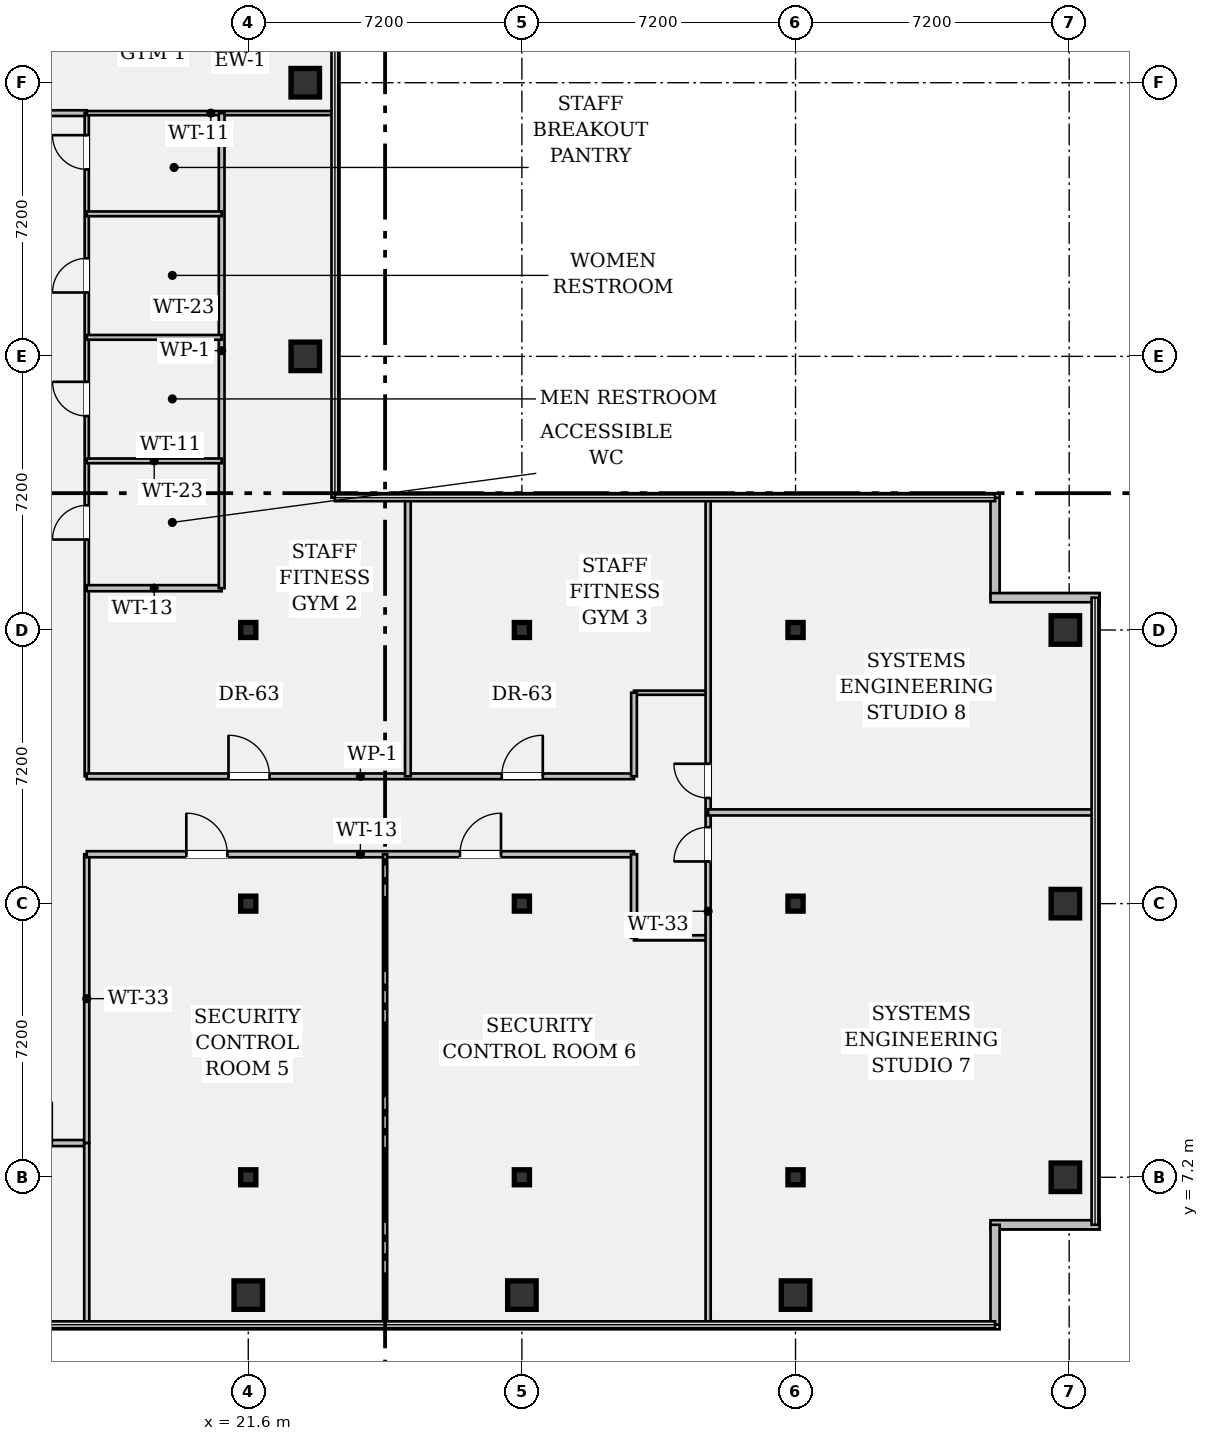
"""IFC4 building model, lengths in metres.
Left out: names, types, materials, properties, quantities, classifications, styles, units other than length and angle.
Written with IfcOpenShell. Run it as: python <this file> out.ifc"""

import sys

from ifc_helpers import new_model, si_unit, direction, frame, frame_2d, origin, origin_2d, place, context, subcontext, project, spatial, rectangle, hollow_rectangle, i_section, extrude, element, fill, save


model = new_model("IFC4")
c1 = context("Model", 3, precision=1e-05, world=origin(), true_north=direction((0.0, 1.0)))
c2 = subcontext(c1, "Body", "Model", "MODEL_VIEW")
j1 = project(units=[si_unit("LENGTHUNIT", "METRE"), si_unit("PLANEANGLEUNIT", "RADIAN")], contexts=[c1])
p1 = place(None, origin())
s1 = spatial("IfcSite", under=j1, at=p1, CompositionType="ELEMENT")
p2 = place(p1, origin())
s2 = spatial("IfcBuilding", under=s1, at=p2, CompositionType="ELEMENT")
p3 = place(p2, frame((0.0, 0.0, 208.25)))
s3 = spatial("IfcBuildingStorey", under=s2, at=p3, CompositionType="ELEMENT", Elevation=208.25)
p4 = place(p3, frame((21.6, 4.1, 0.0), z_axis=(0.0, 0.0, 1.0), x_axis=(1.0, 0.0, 0.0)))
e1 = element("IfcColumn", 1, at=p4, inside=s3, PredefinedType="COLUMN", context=c2, shape_type="SweptSolid", body=[
    extrude(hollow_rectangle(XDim=0.75, YDim=0.75, WallThickness=0.045, at=origin_2d()), origin(), (0.0, 0.0, 1.0), 3.24),
])
for number, where, z_axis, x_axis in (
    (2, (21.6, 7.2, 0.0), (0.0, 0.0, 1.0), (1.0, 0.0, 0.0)),
    (3, (21.6, 14.4, 0.0), (0.0, 0.0, 1.0), (1.0, 0.0, 0.0)),
    (4, (21.6, 21.6, 0.0), (0.0, 0.0, 1.0), (1.0, 0.0, 0.0)),
):
    element("IfcColumn", number, at=place(p3, frame(where, z_axis=z_axis, x_axis=x_axis)), inside=s3, PredefinedType="COLUMN", context=c2, shape_type="SweptSolid", body=[
        extrude(i_section(OverallWidth=0.399, OverallDepth=0.394, WebThickness=0.023, FlangeThickness=0.037, FilletRadius=0.018, at=origin_2d()), origin(), (0.0, 0.0, 1.0), 3.24),
    ])
for number, where, z_axis, x_axis in (
    (5, (23.1, 28.8, 0.0), (0.0, 0.0, 1.0), (1.0, 0.0, 0.0)),
    (6, (23.1, 36.0, 0.0), (0.0, 0.0, 1.0), (1.0, 0.0, 0.0)),
    (7, (28.8, 4.1, 0.0), (0.0, 0.0, 1.0), (1.0, 0.0, 0.0)),
):
    element("IfcColumn", number, at=place(p3, frame(where, z_axis=z_axis, x_axis=x_axis)), inside=s3, PredefinedType="COLUMN", context=c2, shape_type="SweptSolid", body=[
        extrude(hollow_rectangle(XDim=0.75, YDim=0.75, WallThickness=0.045, at=origin_2d()), origin(), (0.0, 0.0, 1.0), 3.24),
    ])
for number, where, z_axis, x_axis in (
    (8, (28.8, 7.2, 0.0), (0.0, 0.0, 1.0), (1.0, 0.0, 0.0)),
    (9, (28.8, 14.4, 0.0), (0.0, 0.0, 1.0), (1.0, 0.0, 0.0)),
    (10, (28.8, 21.6, 0.0), (0.0, 0.0, 1.0), (1.0, 0.0, 0.0)),
):
    element("IfcColumn", number, at=place(p3, frame(where, z_axis=z_axis, x_axis=x_axis)), inside=s3, PredefinedType="COLUMN", context=c2, shape_type="SweptSolid", body=[
        extrude(i_section(OverallWidth=0.399, OverallDepth=0.394, WebThickness=0.023, FlangeThickness=0.037, FilletRadius=0.018, at=origin_2d()), origin(), (0.0, 0.0, 1.0), 3.24),
    ])
p5 = place(p3, frame((36.0, 4.1, 0.0), z_axis=(0.0, 0.0, 1.0), x_axis=(1.0, 0.0, 0.0)))
e11 = element("IfcColumn", 11, at=p5, inside=s3, PredefinedType="COLUMN", context=c2, shape_type="SweptSolid", body=[
    extrude(hollow_rectangle(XDim=0.75, YDim=0.75, WallThickness=0.045, at=origin_2d()), origin(), (0.0, 0.0, 1.0), 3.24),
])
for number, where, z_axis, x_axis in (
    (12, (36.0, 7.2, 0.0), (0.0, 0.0, 1.0), (1.0, 0.0, 0.0)),
    (13, (36.0, 14.4, 0.0), (0.0, 0.0, 1.0), (1.0, 0.0, 0.0)),
    (14, (36.0, 21.6, 0.0), (0.0, 0.0, 1.0), (1.0, 0.0, 0.0)),
):
    element("IfcColumn", number, at=place(p3, frame(where, z_axis=z_axis, x_axis=x_axis)), inside=s3, PredefinedType="COLUMN", context=c2, shape_type="SweptSolid", body=[
        extrude(i_section(OverallWidth=0.399, OverallDepth=0.394, WebThickness=0.023, FlangeThickness=0.037, FilletRadius=0.018, at=origin_2d()), origin(), (0.0, 0.0, 1.0), 3.24),
    ])
for number, where, z_axis, x_axis in (
    (15, (43.1, 7.2, 0.0), (0.0, 0.0, 1.0), (1.0, 0.0, 0.0)),
    (16, (43.1, 14.4, 0.0), (0.0, 0.0, 1.0), (1.0, 0.0, 0.0)),
    (17, (43.1, 21.6, 0.0), (0.0, 0.0, 1.0), (1.0, 0.0, 0.0)),
):
    element("IfcColumn", number, at=place(p3, frame(where, z_axis=z_axis, x_axis=x_axis)), inside=s3, PredefinedType="COLUMN", context=c2, shape_type="SweptSolid", body=[
        extrude(hollow_rectangle(XDim=0.75, YDim=0.75, WallThickness=0.045, at=origin_2d()), origin(), (0.0, 0.0, 1.0), 3.24),
    ])
p6 = place(p3, frame((41.25, 25.08, 0.0), z_axis=(0.0, 0.0, 1.0), x_axis=(0.0, -1.0, 0.0)))
e18 = element("IfcWall", 18, at=p6, inside=s3, PredefinedType="STANDARD", context=c2, shape_type="SweptSolid", body=[
    extrude(rectangle(XDim=2.63, YDim=0.24, at=frame_2d((1.315, 0.0))), origin(), (0.0, 0.0, 1.0), 3.24),
])
for number, where, z_axis, x_axis in (
    (19, (41.13, 22.45, 0.0), (0.0, 0.0, 1.0), (1.0, 0.0, 0.0)),
    (20, (44.0, 5.95, 0.0), (0.0, 0.0, 1.0), (-1.0, 0.0, 0.0)),
):
    element("IfcWall", number, at=place(p3, frame(where, z_axis=z_axis, x_axis=x_axis)), inside=s3, PredefinedType="STANDARD", context=c2, shape_type="SweptSolid", body=[
        extrude(rectangle(XDim=2.87, YDim=0.24, at=frame_2d((1.435, 0.0))), origin(), (0.0, 0.0, 1.0), 3.24),
    ])
p7 = place(p3, frame((41.25, 5.95, 0.0), z_axis=(0.0, 0.0, 1.0), x_axis=(0.0, -1.0, 0.0)))
e21 = element("IfcWall", 21, at=p7, inside=s3, PredefinedType="STANDARD", context=c2, shape_type="SweptSolid", body=[
    extrude(rectangle(XDim=2.63, YDim=0.24, at=frame_2d((1.315, 0.0))), origin(), (0.0, 0.0, 1.0), 3.24),
])
p8 = place(p3, frame((14.4, 8.1, 0.0), z_axis=(0.0, 0.0, 1.0), x_axis=(1.0, 0.0, 0.0)))
e22 = element("IfcWall", 22, at=p8, inside=s3, PredefinedType="PARTITIONING", context=c2, shape_type="SweptSolid", body=[
    extrude(rectangle(XDim=2.95, YDim=0.16, at=frame_2d((1.475, 0.0))), origin(), (0.0, 0.0, 1.0), 2.808),
])
p9 = place(p8, frame((0.95, 0.0, 0.0)))
e23 = element("IfcOpeningElement", 23, at=p9, cuts=e22, PredefinedType="OPENING", context=c2, shape_type="SweptSolid", body=[
    extrude(rectangle(XDim=1.08, YDim=2.15, at=frame_2d((0.54, 1.075))), frame((0.0, 0.092, 0.0), z_axis=(0.0, -1.0, 0.0), x_axis=(1.0, 0.0, 0.0)), (0.0, 0.0, 1.0), 0.184),
])
p10 = place(p3, frame((14.4, 35.2, 0.0), z_axis=(0.0, 0.0, 1.0), x_axis=(1.0, 0.0, 0.0)))
e24 = element("IfcWall", 24, at=p10, inside=s3, PredefinedType="PARTITIONING", context=c2, shape_type="SweptSolid", body=[
    extrude(rectangle(XDim=2.95, YDim=0.15, at=frame_2d((1.475, 0.0))), origin(), (0.0, 0.0, 1.0), 2.808),
])
p11 = place(p10, frame((0.95, 0.0, 0.0)))
e25 = element("IfcOpeningElement", 25, at=p11, cuts=e24, PredefinedType="OPENING", context=c2, shape_type="SweptSolid", body=[
    extrude(rectangle(XDim=1.0, YDim=2.15, at=frame_2d((0.5, 1.075))), frame((0.0, 0.087, 0.0), z_axis=(0.0, -1.0, 0.0), x_axis=(1.0, 0.0, 0.0)), (0.0, 0.0, 1.0), 0.174),
])
p12 = place(p3, frame((17.35, 8.1, 0.0), z_axis=(0.0, 0.0, 1.0), x_axis=(0.0, 1.0, 0.0)))
e26 = element("IfcWall", 26, at=p12, inside=s3, PredefinedType="PARTITIONING", context=c2, shape_type="SweptSolid", body=[
    extrude(rectangle(XDim=7.6, YDim=0.135, at=frame_2d((3.8, 0.0))), origin(), (0.0, 0.0, 1.0), 2.613),
])
p13 = place(p3, frame((17.35, 17.75, 0.0), z_axis=(0.0, 0.0, 1.0), x_axis=(0.0, 1.0, 0.0)))
e27 = element("IfcWall", 27, at=p13, inside=s3, PredefinedType="PARTITIONING", context=c2, shape_type="SweptSolid", body=[
    extrude(rectangle(XDim=17.45, YDim=0.11, at=frame_2d((8.725, 0.0))), origin(), (0.0, 0.0, 1.0), 2.613),
])
p14 = place(p13, frame((6.23, 0.0, 0.0)))
e28 = element("IfcOpeningElement", 28, at=p14, cuts=e27, PredefinedType="OPENING", context=c2, shape_type="SweptSolid", body=[
    extrude(rectangle(XDim=0.9, YDim=2.15, at=frame_2d((0.45, 1.075))), frame((0.0, 0.067, 0.0), z_axis=(0.0, -1.0, 0.0), x_axis=(1.0, 0.0, 0.0)), (0.0, 0.0, 1.0), 0.134),
])
p15 = place(p13, frame((9.48, 0.0, 0.0)))
e29 = element("IfcOpeningElement", 29, at=p15, cuts=e27, PredefinedType="OPENING", context=c2, shape_type="SweptSolid", body=[
    extrude(rectangle(XDim=0.9, YDim=2.15, at=frame_2d((0.45, 1.075))), frame((0.0, 0.067, 0.0), z_axis=(0.0, -1.0, 0.0), x_axis=(1.0, 0.0, 0.0)), (0.0, 0.0, 1.0), 0.134),
])
p16 = place(p13, frame((12.73, 0.0, 0.0)))
e30 = element("IfcOpeningElement", 30, at=p16, cuts=e27, PredefinedType="OPENING", context=c2, shape_type="SweptSolid", body=[
    extrude(rectangle(XDim=0.9, YDim=2.15, at=frame_2d((0.45, 1.075))), frame((0.0, 0.067, 0.0), z_axis=(0.0, -1.0, 0.0), x_axis=(1.0, 0.0, 0.0)), (0.0, 0.0, 1.0), 0.134),
])
p17 = place(p13, frame((15.97, 0.0, 0.0)))
e31 = element("IfcOpeningElement", 31, at=p17, cuts=e27, PredefinedType="OPENING", context=c2, shape_type="SweptSolid", body=[
    extrude(rectangle(XDim=0.9, YDim=2.15, at=frame_2d((0.45, 1.075))), frame((0.0, 0.067, 0.0), z_axis=(0.0, -1.0, 0.0), x_axis=(1.0, 0.0, 0.0)), (0.0, 0.0, 1.0), 0.134),
])
p18 = place(p3, frame((17.35, 15.7, 0.0), z_axis=(0.0, 0.0, 1.0), x_axis=(1.0, 0.0, 0.0)))
e32 = element("IfcWall", 32, at=p18, inside=s3, PredefinedType="PARTITIONING", context=c2, shape_type="SweptSolid", body=[
    extrude(rectangle(XDim=14.4, YDim=0.16, at=frame_2d((7.2, 0.0))), origin(), (0.0, 0.0, 1.0), 2.613),
])
p19 = place(p18, frame((2.62, 0.0, 0.0)))
e33 = element("IfcOpeningElement", 33, at=p19, cuts=e32, PredefinedType="OPENING", context=c2, shape_type="SweptSolid", body=[
    extrude(rectangle(XDim=1.08, YDim=2.15, at=frame_2d((0.54, 1.075))), frame((0.0, 0.092, 0.0), z_axis=(0.0, -1.0, 0.0), x_axis=(1.0, 0.0, 0.0)), (0.0, 0.0, 1.0), 0.184),
])
p20 = place(p18, frame((9.82, 0.0, 0.0)))
e34 = element("IfcOpeningElement", 34, at=p20, cuts=e32, PredefinedType="OPENING", context=c2, shape_type="SweptSolid", body=[
    extrude(rectangle(XDim=1.08, YDim=2.15, at=frame_2d((0.54, 1.075))), frame((0.0, 0.092, 0.0), z_axis=(0.0, -1.0, 0.0), x_axis=(1.0, 0.0, 0.0)), (0.0, 0.0, 1.0), 0.184),
])
p21 = place(p3, frame((17.35, 17.75, 0.0), z_axis=(0.0, 0.0, 1.0), x_axis=(1.0, 0.0, 0.0)))
e35 = element("IfcWall", 35, at=p21, inside=s3, PredefinedType="PARTITIONING", context=c2, shape_type="SweptSolid", body=[
    extrude(rectangle(XDim=14.4, YDim=0.15, at=frame_2d((7.2, 0.0))), origin(), (0.0, 0.0, 1.0), 2.613),
])
p22 = place(p21, frame((3.73, 0.0, 0.0)))
e36 = element("IfcOpeningElement", 36, at=p22, cuts=e35, PredefinedType="OPENING", context=c2, shape_type="SweptSolid", body=[
    extrude(rectangle(XDim=1.08, YDim=2.15, at=frame_2d((0.54, 1.075))), frame((0.0, 0.087, 0.0), z_axis=(0.0, -1.0, 0.0), x_axis=(1.0, 0.0, 0.0)), (0.0, 0.0, 1.0), 0.174),
])
p23 = place(p21, frame((10.92, 0.0, 0.0)))
e37 = element("IfcOpeningElement", 37, at=p23, cuts=e35, PredefinedType="OPENING", context=c2, shape_type="SweptSolid", body=[
    extrude(rectangle(XDim=1.08, YDim=2.15, at=frame_2d((0.54, 1.075))), frame((0.0, 0.087, 0.0), z_axis=(0.0, -1.0, 0.0), x_axis=(1.0, 0.0, 0.0)), (0.0, 0.0, 1.0), 0.174),
])
p24 = place(p3, frame((31.75, 13.5, 0.0), z_axis=(0.0, 0.0, 1.0), x_axis=(1.0, 0.0, 0.0)))
e38 = element("IfcWall", 38, at=p24, inside=s3, PredefinedType="PARTITIONING", context=c2, shape_type="SweptSolid", body=[
    extrude(rectangle(XDim=1.95, YDim=0.135, at=frame_2d((0.975, 0.0))), origin(), (0.0, 0.0, 1.0), 2.808),
])
p25 = place(p3, frame((31.75, 19.95, 0.0), z_axis=(0.0, 0.0, 1.0), x_axis=(1.0, 0.0, 0.0)))
e39 = element("IfcWall", 39, at=p25, inside=s3, PredefinedType="PARTITIONING", context=c2, shape_type="SweptSolid", body=[
    extrude(rectangle(XDim=1.95, YDim=0.11, at=frame_2d((0.975, 0.0))), origin(), (0.0, 0.0, 1.0), 2.808),
])
p26 = place(p3, frame((31.75, 13.5, 0.0), z_axis=(0.0, 0.0, 1.0), x_axis=(0.0, 1.0, 0.0)))
e40 = element("IfcWall", 40, at=p26, inside=s3, PredefinedType="PARTITIONING", context=c2, shape_type="SweptSolid", body=[
    extrude(rectangle(XDim=2.2, YDim=0.16, at=frame_2d((1.1, 0.0))), origin(), (0.0, 0.0, 1.0), 2.613),
])
p27 = place(p3, frame((31.75, 17.75, 0.0), z_axis=(0.0, 0.0, 1.0), x_axis=(0.0, 1.0, 0.0)))
e41 = element("IfcWall", 41, at=p27, inside=s3, PredefinedType="PARTITIONING", context=c2, shape_type="SweptSolid", body=[
    extrude(rectangle(XDim=2.2, YDim=0.15, at=frame_2d((1.1, 0.0))), origin(), (0.0, 0.0, 1.0), 3.24),
])
p28 = place(p3, frame((33.7, 3.32, 0.0), z_axis=(0.0, 0.0, 1.0), x_axis=(0.0, 1.0, 0.0)))
e42 = element("IfcWall", 42, at=p28, inside=s3, PredefinedType="PARTITIONING", context=c2, shape_type="SweptSolid", body=[
    extrude(rectangle(XDim=21.76, YDim=0.135, at=frame_2d((10.88, 0.0))), origin(), (0.0, 0.0, 1.0), 2.613),
])
p29 = place(p28, frame((12.19, 0.0, 0.0)))
e43 = element("IfcOpeningElement", 43, at=p29, cuts=e42, PredefinedType="OPENING", context=c2, shape_type="SweptSolid", body=[
    extrude(rectangle(XDim=0.9, YDim=2.15, at=frame_2d((0.45, 1.075))), frame((0.0, 0.08, 0.0), z_axis=(0.0, -1.0, 0.0), x_axis=(1.0, 0.0, 0.0)), (0.0, 0.0, 1.0), 0.159),
])
p30 = place(p28, frame((13.86, 0.0, 0.0)))
e44 = element("IfcOpeningElement", 44, at=p30, cuts=e42, PredefinedType="OPENING", context=c2, shape_type="SweptSolid", body=[
    extrude(rectangle(XDim=0.9, YDim=2.15, at=frame_2d((0.45, 1.075))), frame((0.0, 0.08, 0.0), z_axis=(0.0, -1.0, 0.0), x_axis=(1.0, 0.0, 0.0)), (0.0, 0.0, 1.0), 0.159),
])
p31 = place(p3, frame((17.35, 35.2, 0.0), z_axis=(0.0, 0.0, 1.0), x_axis=(1.0, 0.0, 0.0)))
e45 = element("IfcWall", 45, at=p31, inside=s3, PredefinedType="PARTITIONING", context=c2, shape_type="SweptSolid", body=[
    extrude(rectangle(XDim=6.53, YDim=0.11, at=frame_2d((3.265, 0.0))), origin(), (0.0, 0.0, 1.0), 2.758),
])
p32 = place(p3, frame((17.35, 22.7, 0.0), z_axis=(0.0, 0.0, 1.0), x_axis=(1.0, 0.0, 0.0)))
e46 = element("IfcWall", 46, at=p32, inside=s3, PredefinedType="PARTITIONING", context=c2, shape_type="SweptSolid", body=[
    extrude(rectangle(XDim=3.55, YDim=0.16, at=frame_2d((1.775, 0.0))), origin(), (0.0, 0.0, 1.0), 2.808),
])
p33 = place(p3, frame((20.9, 22.7, 0.0), z_axis=(0.0, 0.0, 1.0), x_axis=(0.0, 1.0, 0.0)))
e47 = element("IfcWall", 47, at=p33, inside=s3, PredefinedType="PARTITIONING", context=c2, shape_type="SweptSolid", body=[
    extrude(rectangle(XDim=12.5, YDim=0.15, at=frame_2d((6.25, 0.0))), origin(), (0.0, 0.0, 1.0), 2.613),
])
for number, where, z_axis, x_axis in (
    (48, (17.35, 26.05, 0.0), (0.0, 0.0, 1.0), (1.0, 0.0, 0.0)),
    (49, (17.35, 29.3, 0.0), (0.0, 0.0, 1.0), (1.0, 0.0, 0.0)),
    (50, (17.35, 32.55, 0.0), (0.0, 0.0, 1.0), (1.0, 0.0, 0.0)),
):
    element("IfcWall", number, at=place(p3, frame(where, z_axis=z_axis, x_axis=x_axis)), inside=s3, PredefinedType="PARTITIONING", context=c2, shape_type="SweptSolid", body=[
        extrude(rectangle(XDim=3.55, YDim=0.125, at=frame_2d((1.775, 0.0))), origin(), (0.0, 0.0, 1.0), 2.808),
    ])
p34 = place(p3, frame((25.8, 17.75, 0.0), z_axis=(0.0, 0.0, 1.0), x_axis=(0.0, 1.0, 0.0)))
e51 = element("IfcWall", 51, at=p34, inside=s3, PredefinedType="PARTITIONING", context=c2, shape_type="SweptSolid", body=[
    extrude(rectangle(XDim=7.3, YDim=0.15, at=frame_2d((3.65, 0.0))), origin(), (0.0, 0.0, 1.0), 2.613),
])
p35 = place(p3, frame((17.35, 3.32, 0.0), z_axis=(0.0, 0.0, 1.0), x_axis=(0.0, 1.0, 0.0)))
e52 = element("IfcWall", 52, at=p35, inside=s3, PredefinedType="PARTITIONING", context=c2, shape_type="SweptSolid", body=[
    extrude(rectangle(XDim=4.78, YDim=0.135, at=frame_2d((2.39, 0.0))), origin(), (0.0, 0.0, 1.0), 2.613),
])
p36 = place(p3, frame((25.2, 3.32, 0.0), z_axis=(0.0, 0.0, 1.0), x_axis=(0.0, 1.0, 0.0)))
e53 = element("IfcWall", 53, at=p36, inside=s3, PredefinedType="PARTITIONING", context=c2, shape_type="SweptSolid", body=[
    extrude(rectangle(XDim=12.38, YDim=0.11, at=frame_2d((6.19, 0.0))), origin(), (0.0, 0.0, 1.0), 2.613),
])
p37 = place(p3, frame((33.7, 16.8, 0.0), z_axis=(0.0, 0.0, 1.0), x_axis=(1.0, 0.0, 0.0)))
e54 = element("IfcWall", 54, at=p37, inside=s3, PredefinedType="PARTITIONING", context=c2, shape_type="SweptSolid", body=[
    extrude(rectangle(XDim=10.18, YDim=0.16, at=frame_2d((5.09, 0.0))), origin(), (0.0, 0.0, 1.0), 2.613),
])
p38 = place(p14, origin())
e55 = element("IfcDoor", 55, at=p38, inside=s3, OperationType="SINGLE_SWING_LEFT", PredefinedType="DOOR", context=c2, shape_type="SweptSolid", body=[
    extrude(rectangle(XDim=0.9, YDim=2.15, at=frame_2d((0.45, 1.075))), frame((0.0, 0.025, 0.0), z_axis=(0.0, -1.0, 0.0), x_axis=(1.0, 0.0, 0.0)), (0.0, 0.0, 1.0), 0.05),
])
fill(e28, e55)
p39 = place(p15, origin())
e56 = element("IfcDoor", 56, at=p39, inside=s3, OperationType="SINGLE_SWING_RIGHT", PredefinedType="DOOR", context=c2, shape_type="SweptSolid", body=[
    extrude(rectangle(XDim=0.9, YDim=2.15, at=frame_2d((0.45, 1.075))), frame((0.0, 0.025, 0.0), z_axis=(0.0, -1.0, 0.0), x_axis=(1.0, 0.0, 0.0)), (0.0, 0.0, 1.0), 0.05),
])
fill(e29, e56)
p40 = place(p16, origin())
e57 = element("IfcDoor", 57, at=p40, inside=s3, OperationType="SINGLE_SWING_LEFT", PredefinedType="DOOR", context=c2, shape_type="SweptSolid", body=[
    extrude(rectangle(XDim=0.9, YDim=2.15, at=frame_2d((0.45, 1.075))), frame((0.0, 0.025, 0.0), z_axis=(0.0, -1.0, 0.0), x_axis=(1.0, 0.0, 0.0)), (0.0, 0.0, 1.0), 0.05),
])
fill(e30, e57)
p41 = place(p17, origin())
e58 = element("IfcDoor", 58, at=p41, inside=s3, OperationType="SINGLE_SWING_RIGHT", PredefinedType="DOOR", context=c2, shape_type="SweptSolid", body=[
    extrude(rectangle(XDim=0.9, YDim=2.15, at=frame_2d((0.45, 1.075))), frame((0.0, 0.025, 0.0), z_axis=(0.0, -1.0, 0.0), x_axis=(1.0, 0.0, 0.0)), (0.0, 0.0, 1.0), 0.05),
])
fill(e31, e58)
p42 = place(p22, origin())
e59 = element("IfcDoor", 59, at=p42, inside=s3, OperationType="SINGLE_SWING_LEFT", PredefinedType="DOOR", context=c2, shape_type="SweptSolid", body=[
    extrude(rectangle(XDim=1.08, YDim=2.15, at=frame_2d((0.54, 1.075))), frame((0.0, 0.025, 0.0), z_axis=(0.0, -1.0, 0.0), x_axis=(1.0, 0.0, 0.0)), (0.0, 0.0, 1.0), 0.05),
])
fill(e36, e59)
p43 = place(p23, origin())
e60 = element("IfcDoor", 60, at=p43, inside=s3, OperationType="SINGLE_SWING_RIGHT", PredefinedType="DOOR", context=c2, shape_type="SweptSolid", body=[
    extrude(rectangle(XDim=1.08, YDim=2.15, at=frame_2d((0.54, 1.075))), frame((0.0, 0.025, 0.0), z_axis=(0.0, -1.0, 0.0), x_axis=(1.0, 0.0, 0.0)), (0.0, 0.0, 1.0), 0.05),
])
fill(e37, e60)
p44 = place(p19, origin())
e61 = element("IfcDoor", 61, at=p44, inside=s3, OperationType="SINGLE_SWING_LEFT", PredefinedType="DOOR", context=c2, shape_type="SweptSolid", body=[
    extrude(rectangle(XDim=1.08, YDim=2.15, at=frame_2d((0.54, 1.075))), frame((0.0, 0.025, 0.0), z_axis=(0.0, -1.0, 0.0), x_axis=(1.0, 0.0, 0.0)), (0.0, 0.0, 1.0), 0.05),
])
fill(e33, e61)
p45 = place(p20, origin())
e62 = element("IfcDoor", 62, at=p45, inside=s3, OperationType="SINGLE_SWING_RIGHT", PredefinedType="DOOR", context=c2, shape_type="SweptSolid", body=[
    extrude(rectangle(XDim=1.08, YDim=2.15, at=frame_2d((0.54, 1.075))), frame((0.0, 0.025, 0.0), z_axis=(0.0, -1.0, 0.0), x_axis=(1.0, 0.0, 0.0)), (0.0, 0.0, 1.0), 0.05),
])
fill(e34, e62)
p46 = place(p29, origin())
e63 = element("IfcDoor", 63, at=p46, inside=s3, OperationType="SINGLE_SWING_LEFT", PredefinedType="DOOR", context=c2, shape_type="SweptSolid", body=[
    extrude(rectangle(XDim=0.9, YDim=2.15, at=frame_2d((0.45, 1.075))), frame((0.0, 0.025, 0.0), z_axis=(0.0, -1.0, 0.0), x_axis=(1.0, 0.0, 0.0)), (0.0, 0.0, 1.0), 0.05),
])
fill(e43, e63)
p47 = place(p30, origin())
e64 = element("IfcDoor", 64, at=p47, inside=s3, OperationType="SINGLE_SWING_RIGHT", PredefinedType="DOOR", context=c2, shape_type="SweptSolid", body=[
    extrude(rectangle(XDim=0.9, YDim=2.15, at=frame_2d((0.45, 1.075))), frame((0.0, 0.025, 0.0), z_axis=(0.0, -1.0, 0.0), x_axis=(1.0, 0.0, 0.0)), (0.0, 0.0, 1.0), 0.05),
])
fill(e44, e64)
save(model, sys.argv[1])
